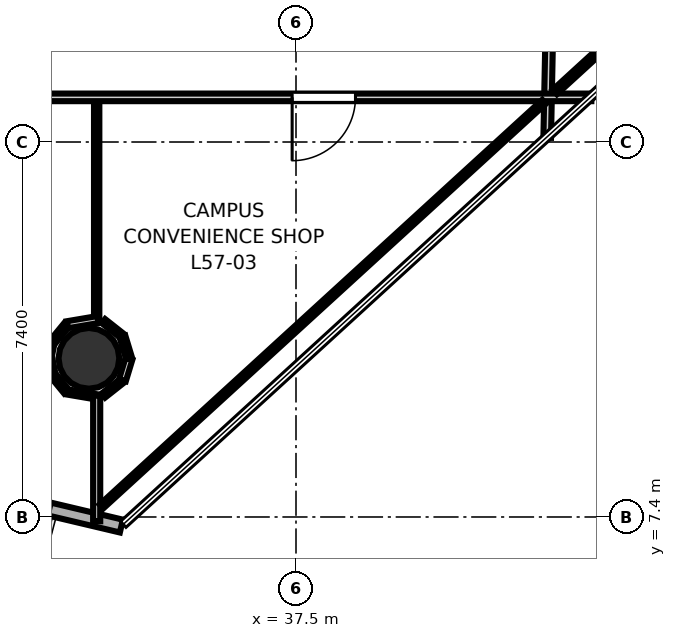
"""IFC4 building model, lengths in metres.
Left out: names, types, materials, properties, quantities, classifications, styles, units other than length and angle.
Written with IfcOpenShell. Run it as: python <this file> out.ifc"""

import sys

from ifc_helpers import new_model, si_unit, direction, frame, frame_2d, origin, origin_2d, place, context, subcontext, project, spatial, rectangle, hollow_circle, extrude, element, fill, save


model = new_model("IFC4")
c1 = context("Model", 3, precision=1e-05, world=origin(), true_north=direction((0.0, 1.0)))
c2 = subcontext(c1, "Body", "Model", "MODEL_VIEW")
j1 = project(units=[si_unit("LENGTHUNIT", "METRE"), si_unit("PLANEANGLEUNIT", "RADIAN")], contexts=[c1])
p1 = place(None, origin())
s1 = spatial("IfcSite", under=j1, at=p1, CompositionType="ELEMENT")
p2 = place(p1, origin())
s2 = spatial("IfcBuilding", under=s1, at=p2, CompositionType="ELEMENT")
p3 = place(p2, frame((0.0, 0.0, 222.5)))
s3 = spatial("IfcBuildingStorey", under=s2, at=p3, CompositionType="ELEMENT", Elevation=222.5)
p4 = place(p3, frame((33.413, 10.531, 0.0), z_axis=(0.0, 0.0, 1.0), x_axis=(1.0, 0.0, 0.0)))
e1 = element("IfcColumn", 1, at=p4, inside=s3, PredefinedType="COLUMN", context=c2, shape_type="SweptSolid", body=[
    extrude(hollow_circle(Radius=0.6, WallThickness=0.03, at=origin_2d()), origin(), (0.0, 0.0, 1.0), 3.7),
])
p5 = place(p3, frame((27.459, 8.781, 0.0), z_axis=(0.0, 0.0, 1.0), x_axis=(0.973151464815, -0.230165650194, 0.0)))
e2 = element("IfcWall", 2, at=p5, inside=s3, PredefinedType="SOLIDWALL", context=c2, shape_type="SweptSolid", body=[
    extrude(rectangle(XDim=6.777, YDim=0.26, at=frame_2d((3.388, 0.0))), origin(), (0.0, 0.0, 1.0), 3.52),
])
p6 = place(p5, frame((1.433, 0.0, 0.9)))
e3 = element("IfcOpeningElement", 3, at=p6, cuts=e2, PredefinedType="OPENING", context=c2, shape_type="SweptSolid", body=[
    extrude(rectangle(XDim=1.2, YDim=2.0, at=frame_2d((0.6, 1.0))), frame((0.0, 0.14, 0.0), z_axis=(0.0, -1.0, 0.0), x_axis=(1.0, 0.0, 0.0)), (0.0, 0.0, 1.0), 0.28),
])
p7 = place(p5, frame((4.144, 0.0, 0.9)))
e4 = element("IfcOpeningElement", 4, at=p7, cuts=e2, PredefinedType="OPENING", context=c2, shape_type="SweptSolid", body=[
    extrude(rectangle(XDim=1.2, YDim=2.0, at=frame_2d((0.6, 1.0))), frame((0.0, 0.14, 0.0), z_axis=(0.0, -1.0, 0.0), x_axis=(1.0, 0.0, 0.0)), (0.0, 0.0, 1.0), 0.28),
])
p8 = place(p3, frame((42.519, 17.981, 0.0), z_axis=(0.0, 0.0, 1.0), x_axis=(-0.019860499427, -0.99980276083, 0.0)))
e5 = element("IfcWall", 5, at=p8, inside=s3, PredefinedType="PARTITIONING", context=c2, shape_type="SweptSolid", body=[
    extrude(rectangle(XDim=3.098, YDim=0.15, at=frame_2d((1.549, 0.0))), origin(), (0.0, 0.0, 1.0), 2.84),
])
p9 = place(p3, frame((43.328, 15.681, 0.0), z_axis=(0.0, 0.0, 1.0), x_axis=(-1.0, 0.0, 0.0)))
e6 = element("IfcWall", 6, at=p9, inside=s3, PredefinedType="PARTITIONING", context=c2, shape_type="SweptSolid", body=[
    extrude(rectangle(XDim=14.928, YDim=0.15, at=frame_2d((7.464, 0.0))), origin(), (0.0, 0.0, 1.0), 2.84),
])
p10 = place(p9, frame((11.334, 0.0, 0.0)))
e7 = element("IfcOpeningElement", 7, at=p10, cuts=e6, PredefinedType="OPENING", context=c2, shape_type="SweptSolid", body=[
    extrude(rectangle(XDim=1.25, YDim=2.2, at=frame_2d((0.625, 1.1))), frame((0.0, 0.085, 0.0), z_axis=(0.0, -1.0, 0.0), x_axis=(1.0, 0.0, 0.0)), (0.0, 0.0, 1.0), 0.17),
])
p11 = place(p9, frame((4.655, 0.0, 0.0)))
e8 = element("IfcOpeningElement", 8, at=p11, cuts=e6, PredefinedType="OPENING", context=c2, shape_type="SweptSolid", body=[
    extrude(rectangle(XDim=1.25, YDim=2.2, at=frame_2d((0.625, 1.1))), frame((0.0, 0.085, 0.0), z_axis=(0.0, -1.0, 0.0), x_axis=(1.0, 0.0, 0.0)), (0.0, 0.0, 1.0), 0.17),
])
p12 = place(p3, frame((33.566, 15.57, 0.0), z_axis=(0.0, 0.0, 1.0), x_axis=(0.0, -1.0, 0.0)))
e9 = element("IfcWall", 9, at=p12, inside=s3, PredefinedType="PARTITIONING", context=c2, shape_type="SweptSolid", body=[
    extrude(rectangle(XDim=4.305, YDim=0.105, at=frame_2d((2.152, 0.0))), origin(), (0.0, 0.0, 1.0), 2.84),
])
p13 = place(p3, frame((33.592, 11.296, 0.0), z_axis=(0.0, 0.0, 1.0), x_axis=(-0.986004987634, -0.166715819165, 0.0)))
e10 = element("IfcWall", 10, at=p13, inside=s3, PredefinedType="PARTITIONING", context=c2, shape_type="SweptSolid", body=[
    extrude(rectangle(XDim=0.615, YDim=0.14, at=frame_2d((0.308, 0.0))), origin(), (0.0, 0.0, 1.0), 2.84),
])
p14 = place(p3, frame((32.967, 11.183, 0.0), z_axis=(0.0, 0.0, 1.0), x_axis=(-0.634231799198, -0.773142952426, 0.0)))
e11 = element("IfcWall", 11, at=p14, inside=s3, PredefinedType="PARTITIONING", context=c2, shape_type="SweptSolid", body=[
    extrude(rectangle(XDim=0.441, YDim=0.12, at=frame_2d((0.221, 0.0))), origin(), (0.0, 0.0, 1.0), 2.84),
])
p15 = place(p3, frame((32.68, 10.828, 0.0), z_axis=(0.0, 0.0, 1.0), x_axis=(-0.19516586844, -0.980770250261, 0.0)))
e12 = element("IfcWall", 12, at=p15, inside=s3, PredefinedType="PARTITIONING", context=c2, shape_type="SweptSolid", body=[
    extrude(rectangle(XDim=0.296, YDim=0.105, at=frame_2d((0.148, 0.0))), origin(), (0.0, 0.0, 1.0), 2.84),
])
p16 = place(p3, frame((32.623, 10.525, 0.0), z_axis=(0.0, 0.0, 1.0), x_axis=(0.19516586844, -0.980770250261, 0.0)))
e13 = element("IfcWall", 13, at=p16, inside=s3, PredefinedType="PARTITIONING", context=c2, shape_type="SweptSolid", body=[
    extrude(rectangle(XDim=0.296, YDim=0.14, at=frame_2d((0.148, 0.0))), origin(), (0.0, 0.0, 1.0), 2.84),
])
p17 = place(p3, frame((32.687, 10.22, 0.0), z_axis=(0.0, 0.0, 1.0), x_axis=(0.634231799198, -0.773142952426, 0.0)))
e14 = element("IfcWall", 14, at=p17, inside=s3, PredefinedType="PARTITIONING", context=c2, shape_type="SweptSolid", body=[
    extrude(rectangle(XDim=0.441, YDim=0.12, at=frame_2d((0.221, 0.0))), origin(), (0.0, 0.0, 1.0), 2.84),
])
p18 = place(p3, frame((32.986, 9.868, 0.0), z_axis=(0.0, 0.0, 1.0), x_axis=(0.986004987634, -0.166715819165, 0.0)))
e15 = element("IfcWall", 15, at=p18, inside=s3, PredefinedType="PARTITIONING", context=c2, shape_type="SweptSolid", body=[
    extrude(rectangle(XDim=0.615, YDim=0.105, at=frame_2d((0.308, 0.0))), origin(), (0.0, 0.0, 1.0), 2.84),
])
p19 = place(p3, frame((33.566, 9.796, 0.0), z_axis=(0.0, 0.0, 1.0), x_axis=(0.0, -1.0, 0.0)))
e16 = element("IfcWall", 16, at=p19, inside=s3, PredefinedType="PARTITIONING", context=c2, shape_type="SweptSolid", body=[
    extrude(rectangle(XDim=2.48, YDim=0.14, at=frame_2d((1.24, 0.0))), origin(), (0.0, 0.0, 1.0), 2.84),
])
p20 = place(p3, frame((33.7, 9.798, 0.0), z_axis=(0.0, 0.0, 1.0), x_axis=(0.785219888975, 0.619217026541, 0.0)))
e17 = element("IfcWall", 17, at=p20, inside=s3, PredefinedType="PARTITIONING", context=c2, shape_type="SweptSolid", body=[
    extrude(rectangle(XDim=0.463, YDim=0.105, at=frame_2d((0.232, 0.0))), origin(), (0.0, 0.0, 1.0), 2.84),
])
p21 = place(p3, frame((34.075, 10.1, 0.0), z_axis=(0.0, 0.0, 1.0), x_axis=(0.290038119708, 0.957015093463, 0.0)))
e18 = element("IfcWall", 18, at=p21, inside=s3, PredefinedType="PARTITIONING", context=c2, shape_type="SweptSolid", body=[
    extrude(rectangle(XDim=0.441, YDim=0.14, at=frame_2d((0.221, 0.0))), origin(), (0.0, 0.0, 1.0), 2.84),
])
p22 = place(p3, frame((34.203, 10.54, 0.0), z_axis=(0.0, 0.0, 1.0), x_axis=(-0.290038119708, 0.957015093463, 0.0)))
e19 = element("IfcWall", 19, at=p22, inside=s3, PredefinedType="PARTITIONING", context=c2, shape_type="SweptSolid", body=[
    extrude(rectangle(XDim=0.441, YDim=0.12, at=frame_2d((0.221, 0.0))), origin(), (0.0, 0.0, 1.0), 2.84),
])
p23 = place(p3, frame((34.064, 10.978, 0.0), z_axis=(0.0, 0.0, 1.0), x_axis=(-0.785219888975, 0.619217026541, 0.0)))
e20 = element("IfcWall", 20, at=p23, inside=s3, PredefinedType="PARTITIONING", context=c2, shape_type="SweptSolid", body=[
    extrude(rectangle(XDim=0.463, YDim=0.105, at=frame_2d((0.232, 0.0))), origin(), (0.0, 0.0, 1.0), 2.84),
])
p24 = place(p3, frame((42.396, 15.593, 0.0), z_axis=(0.0, 0.0, 1.0), x_axis=(-0.738061977913, -0.67473292254, 0.0)))
e21 = element("IfcWall", 21, at=p24, inside=s3, PredefinedType="PARTITIONING", context=c2, shape_type="SweptSolid", body=[
    extrude(rectangle(XDim=11.835, YDim=0.105, at=frame_2d((5.917, 0.0))), origin(), (0.0, 0.0, 1.0), 2.84),
])
p25 = place(p3, frame((45.191, 18.149, 0.0), z_axis=(0.0, 0.0, 1.0), x_axis=(-0.738077461562, -0.674715985237, 0.0)))
e22 = element("IfcWall", 22, at=p25, inside=s3, PredefinedType="PARTITIONING", context=c2, shape_type="SweptSolid", body=[
    extrude(rectangle(XDim=3.499, YDim=0.12, at=frame_2d((1.749, 0.0))), origin(), (0.0, 0.0, 1.0), 2.84),
])
p26 = place(p11, origin())
e23 = element("IfcDoor", 23, at=p26, inside=s3, OperationType="SINGLE_SWING_RIGHT", PredefinedType="DOOR", context=c2, shape_type="SweptSolid", body=[
    extrude(rectangle(XDim=1.25, YDim=2.2, at=frame_2d((0.625, 1.1))), frame((0.0, 0.025, 0.0), z_axis=(0.0, -1.0, 0.0), x_axis=(1.0, 0.0, 0.0)), (0.0, 0.0, 1.0), 0.05),
])
fill(e8, e23)
save(model, sys.argv[1])
